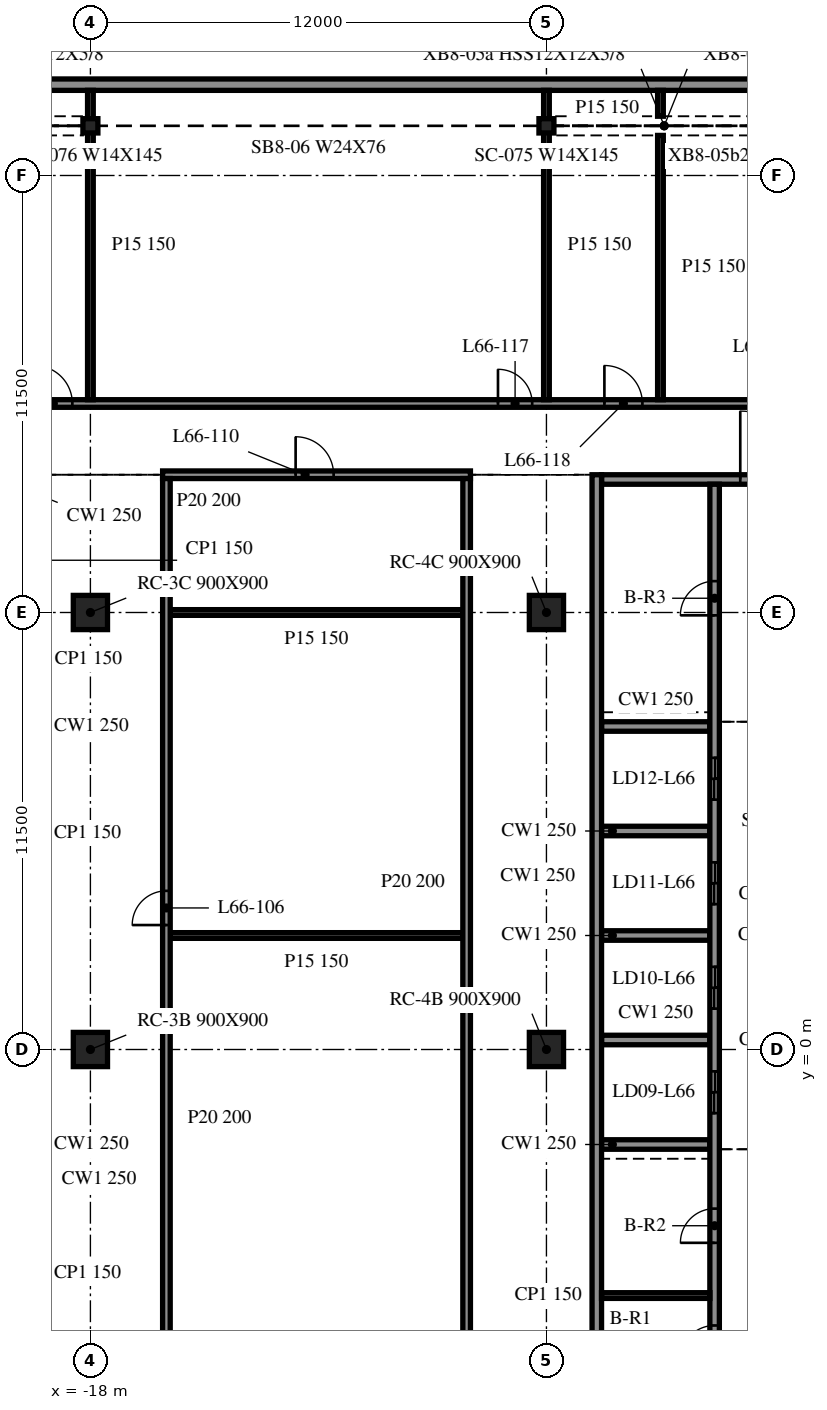
"""IFC4 building model, lengths in metres.
Left out: names, types, materials, properties, quantities, classifications, styles, units other than length and angle.
Written with IfcOpenShell. Run it as: python <this file> out.ifc"""

import sys

from ifc_helpers import new_model, si_unit, direction, frame, frame_2d, origin, origin_2d, place, context, subcontext, project, spatial, rectangle, i_section, extrude, element, fill, save


model = new_model("IFC4")
c1 = context("Model", 3, precision=1e-05, world=origin(), true_north=direction((0.0, 1.0)))
c2 = subcontext(c1, "Body", "Model", "MODEL_VIEW")
j1 = project(units=[si_unit("LENGTHUNIT", "METRE"), si_unit("PLANEANGLEUNIT", "RADIAN")], contexts=[c1])
p1 = place(None, origin())
s1 = spatial("IfcSite", under=j1, at=p1, CompositionType="ELEMENT")
p2 = place(p1, origin())
s2 = spatial("IfcBuilding", under=s1, at=p2, CompositionType="ELEMENT")
p3 = place(p2, frame((0.0, 0.0, 270.9)))
s3 = spatial("IfcBuildingStorey", under=s2, at=p3, CompositionType="ELEMENT", Elevation=270.9)
for number, where, z_axis, x_axis in (
    (1, (-18.0, 0.0, -0.34), (0.0, 0.0, 1.0), (1.0, 0.0, 0.0)),
    (2, (-18.0, 11.5, -0.34), (0.0, 0.0, 1.0), (1.0, 0.0, 0.0)),
    (3, (-6.0, 0.0, -0.34), (0.0, 0.0, 1.0), (1.0, 0.0, 0.0)),
    (4, (-6.0, 11.5, -0.34), (0.0, 0.0, 1.0), (1.0, 0.0, 0.0)),
):
    element("IfcColumn", number, at=place(p3, frame(where, z_axis=z_axis, x_axis=x_axis)), inside=s3, PredefinedType="COLUMN", context=c2, shape_type="SweptSolid", body=[
        extrude(rectangle(XDim=0.9, YDim=0.9, at=origin_2d()), origin(), (0.0, 0.0, 1.0), 3.8),
    ])
for number, where, z_axis, x_axis in (
    (5, (-6.0, 24.307, -0.34), (0.0, 0.0, 1.0), (1.0, 0.0, 0.0)),
    (6, (-18.0, 24.307, -0.34), (0.0, 0.0, 1.0), (1.0, 0.0, 0.0)),
):
    element("IfcColumn", number, at=place(p3, frame(where, z_axis=z_axis, x_axis=x_axis)), inside=s3, PredefinedType="COLUMN", context=c2, shape_type="SweptSolid", body=[
        extrude(i_section(OverallWidth=0.394, OverallDepth=0.376, WebThickness=0.017, FlangeThickness=0.028, at=origin_2d()), origin(), (0.0, 0.0, 1.0), 3.8),
    ])
p4 = place(p3, frame((42.0, 25.39, 0.0), z_axis=(0.0, 0.0, 1.0), x_axis=(-1.0, 0.0, 0.0)))
e7 = element("IfcWall", 7, at=p4, inside=s3, PredefinedType="NOTDEFINED", context=c2, shape_type="SweptSolid", body=[
    extrude(rectangle(XDim=84.0, YDim=0.3, at=frame_2d((42.0, 0.0))), origin(), (0.0, 0.0, 1.0), 2.853),
])
p5 = place(p3, frame((-4.675, 15.125, 0.0), z_axis=(0.0, 0.0, 1.0), x_axis=(0.0, -1.0, 0.0)))
e8 = element("IfcWall", 8, at=p5, inside=s3, PredefinedType="SOLIDWALL", context=c2, shape_type="SweptSolid", body=[
    extrude(rectangle(XDim=24.25, YDim=0.25, at=frame_2d((12.125, 0.0))), origin(), (0.0, 0.0, 1.0), 3.46),
])
p6 = place(p3, frame((-4.55, 15.0, 0.0), z_axis=(0.0, 0.0, 1.0), x_axis=(1.0, 0.0, 0.0)))
e9 = element("IfcWall", 9, at=p6, inside=s3, PredefinedType="SOLIDWALL", context=c2, shape_type="SweptSolid", body=[
    extrude(rectangle(XDim=9.1, YDim=0.25, at=frame_2d((4.55, 0.0))), origin(), (0.0, 0.0, 1.0), 3.46),
])
p7 = place(p6, frame((3.65, 0.0, 0.0)))
e10 = element("IfcOpeningElement", 10, at=p7, cuts=e9, PredefinedType="OPENING", context=c2, shape_type="SweptSolid", body=[
    extrude(rectangle(XDim=1.8, YDim=2.1, at=frame_2d((0.9, 1.05))), frame((0.0, 0.135, 0.0), z_axis=(0.0, -1.0, 0.0), x_axis=(1.0, 0.0, 0.0)), (0.0, 0.0, 1.0), 0.27),
])
p8 = place(p3, frame((-1.575, -8.875, 0.0), z_axis=(0.0, 0.0, 1.0), x_axis=(0.0, 1.0, 0.0)))
e11 = element("IfcWall", 11, at=p8, inside=s3, PredefinedType="SOLIDWALL", context=c2, shape_type="SweptSolid", body=[
    extrude(rectangle(XDim=23.75, YDim=0.25, at=frame_2d((11.875, 0.0))), origin(), (0.0, 0.0, 1.0), 3.46),
])
p9 = place(p8, frame((7.2, 0.0, 0.0)))
e12 = element("IfcOpeningElement", 12, at=p9, cuts=e11, PredefinedType="OPENING", context=c2, shape_type="SweptSolid", body=[
    extrude(rectangle(XDim=1.1, YDim=2.1, at=frame_2d((0.55, 1.05))), frame((0.0, 0.135, 0.0), z_axis=(0.0, -1.0, 0.0), x_axis=(1.0, 0.0, 0.0)), (0.0, 0.0, 1.0), 0.27),
])
p10 = place(p8, frame((9.95, 0.0, 0.0)))
e13 = element("IfcOpeningElement", 13, at=p10, cuts=e11, PredefinedType="OPENING", context=c2, shape_type="SweptSolid", body=[
    extrude(rectangle(XDim=1.1, YDim=2.1, at=frame_2d((0.55, 1.05))), frame((0.0, 0.135, 0.0), z_axis=(0.0, -1.0, 0.0), x_axis=(1.0, 0.0, 0.0)), (0.0, 0.0, 1.0), 0.27),
])
p11 = place(p8, frame((12.7, 0.0, 0.0)))
e14 = element("IfcOpeningElement", 14, at=p11, cuts=e11, PredefinedType="OPENING", context=c2, shape_type="SweptSolid", body=[
    extrude(rectangle(XDim=1.1, YDim=2.1, at=frame_2d((0.55, 1.05))), frame((0.0, 0.135, 0.0), z_axis=(0.0, -1.0, 0.0), x_axis=(1.0, 0.0, 0.0)), (0.0, 0.0, 1.0), 0.27),
])
p12 = place(p8, frame((15.45, 0.0, 0.0)))
e15 = element("IfcOpeningElement", 15, at=p12, cuts=e11, PredefinedType="OPENING", context=c2, shape_type="SweptSolid", body=[
    extrude(rectangle(XDim=1.1, YDim=2.1, at=frame_2d((0.55, 1.05))), frame((0.0, 0.135, 0.0), z_axis=(0.0, -1.0, 0.0), x_axis=(1.0, 0.0, 0.0)), (0.0, 0.0, 1.0), 0.27),
])
p13 = place(p8, frame((0.712, 0.0, 0.0)))
e16 = element("IfcOpeningElement", 16, at=p13, cuts=e11, PredefinedType="OPENING", context=c2, shape_type="SweptSolid", body=[
    extrude(rectangle(XDim=0.9, YDim=2.1, at=frame_2d((0.45, 1.05))), frame((0.0, 0.135, 0.0), z_axis=(0.0, -1.0, 0.0), x_axis=(1.0, 0.0, 0.0)), (0.0, 0.0, 1.0), 0.27),
])
p14 = place(p8, frame((3.788, 0.0, 0.0)))
e17 = element("IfcOpeningElement", 17, at=p14, cuts=e11, PredefinedType="OPENING", context=c2, shape_type="SweptSolid", body=[
    extrude(rectangle(XDim=0.9, YDim=2.1, at=frame_2d((0.45, 1.05))), frame((0.0, 0.135, 0.0), z_axis=(0.0, -1.0, 0.0), x_axis=(1.0, 0.0, 0.0)), (0.0, 0.0, 1.0), 0.27),
])
p15 = place(p8, frame((20.3, 0.0, 0.0)))
e18 = element("IfcOpeningElement", 18, at=p15, cuts=e11, PredefinedType="OPENING", context=c2, shape_type="SweptSolid", body=[
    extrude(rectangle(XDim=0.9, YDim=2.1, at=frame_2d((0.45, 1.05))), frame((0.0, 0.135, 0.0), z_axis=(0.0, -1.0, 0.0), x_axis=(1.0, 0.0, 0.0)), (0.0, 0.0, 1.0), 0.27),
])
for number, where, z_axis, x_axis in (
    (19, (-4.55, -2.5, 0.0), (0.0, 0.0, 1.0), (1.0, 0.0, 0.0)),
    (20, (-4.55, 0.25, 0.0), (0.0, 0.0, 1.0), (1.0, 0.0, 0.0)),
    (21, (-4.55, 3.0, 0.0), (0.0, 0.0, 1.0), (1.0, 0.0, 0.0)),
    (22, (-4.55, 5.75, 0.0), (0.0, 0.0, 1.0), (1.0, 0.0, 0.0)),
    (23, (-4.55, 8.5, 0.0), (0.0, 0.0, 1.0), (1.0, 0.0, 0.0)),
):
    element("IfcWall", number, at=place(p3, frame(where, z_axis=z_axis, x_axis=x_axis)), inside=s3, PredefinedType="SOLIDWALL", context=c2, shape_type="SweptSolid", body=[
        extrude(rectangle(XDim=2.85, YDim=0.25, at=frame_2d((1.425, 0.0))), origin(), (0.0, 0.0, 1.0), 3.46),
    ])
p16 = place(p3, frame((-4.55, -6.475, 0.0), z_axis=(0.0, 0.0, 1.0), x_axis=(1.0, 0.0, 0.0)))
e24 = element("IfcWall", 24, at=p16, inside=s3, PredefinedType="PARTITIONING", context=c2, shape_type="SweptSolid", body=[
    extrude(rectangle(XDim=2.85, YDim=0.15, at=frame_2d((1.425, 0.0))), origin(), (0.0, 0.0, 1.0), 3.46),
])
for number, where, z_axis, x_axis in (
    (25, (-15.9, 3.0, 0.0), (0.0, 0.0, 1.0), (1.0, 0.0, 0.0)),
    (26, (-15.9, 11.5, 0.0), (0.0, 0.0, 1.0), (1.0, 0.0, 0.0)),
):
    element("IfcWall", number, at=place(p3, frame(where, z_axis=z_axis, x_axis=x_axis)), inside=s3, PredefinedType="PARTITIONING", context=c2, shape_type="SweptSolid", body=[
        extrude(rectangle(XDim=7.7, YDim=0.15, at=frame_2d((3.85, 0.0))), origin(), (0.0, 0.0, 1.0), 3.46),
    ])
p17 = place(p3, frame((-16.1, 15.125, 0.0), z_axis=(0.0, 0.0, 1.0), x_axis=(1.0, 0.0, 0.0)))
e27 = element("IfcWall", 27, at=p17, inside=s3, PredefinedType="PARTITIONING", context=c2, shape_type="SweptSolid", body=[
    extrude(rectangle(XDim=8.1, YDim=0.2, at=frame_2d((4.05, 0.0))), origin(), (0.0, 0.0, 1.0), 3.46),
])
p18 = place(p17, frame((3.5, 0.0, 0.0)))
e28 = element("IfcOpeningElement", 28, at=p18, cuts=e27, PredefinedType="OPENING", context=c2, shape_type="SweptSolid", body=[
    extrude(rectangle(XDim=1.0, YDim=2.1, at=frame_2d((0.5, 1.05))), frame((0.0, 0.11, 0.0), z_axis=(0.0, -1.0, 0.0), x_axis=(1.0, 0.0, 0.0)), (0.0, 0.0, 1.0), 0.22),
])
p19 = place(p3, frame((-47.975, 17.0, 0.0), z_axis=(0.0, 0.0, 1.0), x_axis=(1.0, 0.0, 0.0)))
e29 = element("IfcWall", 29, at=p19, inside=s3, PredefinedType="PARTITIONING", context=c2, shape_type="SweptSolid", body=[
    extrude(rectangle(XDim=95.95, YDim=0.2, at=frame_2d((47.975, 0.0))), origin(), (0.0, 0.0, 1.0), 3.46),
])
p20 = place(p19, frame((10.7, 0.0, 0.0)))
e30 = element("IfcOpeningElement", 30, at=p20, cuts=e29, PredefinedType="OPENING", context=c2, shape_type="SweptSolid", body=[
    extrude(rectangle(XDim=0.9, YDim=2.1, at=frame_2d((0.45, 1.05))), frame((0.0, 0.11, 0.0), z_axis=(0.0, -1.0, 0.0), x_axis=(1.0, 0.0, 0.0)), (0.0, 0.0, 1.0), 0.22),
])
p21 = place(p19, frame((13.7, 0.0, 0.0)))
e31 = element("IfcOpeningElement", 31, at=p21, cuts=e29, PredefinedType="OPENING", context=c2, shape_type="SweptSolid", body=[
    extrude(rectangle(XDim=0.9, YDim=2.1, at=frame_2d((0.45, 1.05))), frame((0.0, 0.11, 0.0), z_axis=(0.0, -1.0, 0.0), x_axis=(1.0, 0.0, 0.0)), (0.0, 0.0, 1.0), 0.22),
])
p22 = place(p19, frame((22.5, 0.0, 0.0)))
e32 = element("IfcOpeningElement", 32, at=p22, cuts=e29, PredefinedType="OPENING", context=c2, shape_type="SweptSolid", body=[
    extrude(rectangle(XDim=1.0, YDim=2.1, at=frame_2d((0.5, 1.05))), frame((0.0, 0.11, 0.0), z_axis=(0.0, -1.0, 0.0), x_axis=(1.0, 0.0, 0.0)), (0.0, 0.0, 1.0), 0.22),
])
p23 = place(p19, frame((28.5, 0.0, 0.0)))
e33 = element("IfcOpeningElement", 33, at=p23, cuts=e29, PredefinedType="OPENING", context=c2, shape_type="SweptSolid", body=[
    extrude(rectangle(XDim=1.0, YDim=2.1, at=frame_2d((0.5, 1.05))), frame((0.0, 0.11, 0.0), z_axis=(0.0, -1.0, 0.0), x_axis=(1.0, 0.0, 0.0)), (0.0, 0.0, 1.0), 0.22),
])
p24 = place(p19, frame((40.7, 0.0, 0.0)))
e34 = element("IfcOpeningElement", 34, at=p24, cuts=e29, PredefinedType="OPENING", context=c2, shape_type="SweptSolid", body=[
    extrude(rectangle(XDim=0.9, YDim=2.1, at=frame_2d((0.45, 1.05))), frame((0.0, 0.11, 0.0), z_axis=(0.0, -1.0, 0.0), x_axis=(1.0, 0.0, 0.0)), (0.0, 0.0, 1.0), 0.22),
])
p25 = place(p19, frame((43.5, 0.0, 0.0)))
e35 = element("IfcOpeningElement", 35, at=p25, cuts=e29, PredefinedType="OPENING", context=c2, shape_type="SweptSolid", body=[
    extrude(rectangle(XDim=1.0, YDim=2.1, at=frame_2d((0.5, 1.05))), frame((0.0, 0.11, 0.0), z_axis=(0.0, -1.0, 0.0), x_axis=(1.0, 0.0, 0.0)), (0.0, 0.0, 1.0), 0.22),
])
p26 = place(p19, frame((47.3, 0.0, 0.0)))
e36 = element("IfcOpeningElement", 36, at=p26, cuts=e29, PredefinedType="OPENING", context=c2, shape_type="SweptSolid", body=[
    extrude(rectangle(XDim=0.9, YDim=2.1, at=frame_2d((0.45, 1.05))), frame((0.0, 0.11, 0.0), z_axis=(0.0, -1.0, 0.0), x_axis=(1.0, 0.0, 0.0)), (0.0, 0.0, 1.0), 0.22),
])
p27 = place(p19, frame((54.1, 0.0, 0.0)))
e37 = element("IfcOpeningElement", 37, at=p27, cuts=e29, PredefinedType="OPENING", context=c2, shape_type="SweptSolid", body=[
    extrude(rectangle(XDim=0.9, YDim=2.1, at=frame_2d((0.45, 1.05))), frame((0.0, 0.11, 0.0), z_axis=(0.0, -1.0, 0.0), x_axis=(1.0, 0.0, 0.0)), (0.0, 0.0, 1.0), 0.22),
])
p28 = place(p19, frame((60.1, 0.0, 0.0)))
e38 = element("IfcOpeningElement", 38, at=p28, cuts=e29, PredefinedType="OPENING", context=c2, shape_type="SweptSolid", body=[
    extrude(rectangle(XDim=1.0, YDim=2.1, at=frame_2d((0.5, 1.05))), frame((0.0, 0.11, 0.0), z_axis=(0.0, -1.0, 0.0), x_axis=(1.0, 0.0, 0.0)), (0.0, 0.0, 1.0), 0.22),
])
p29 = place(p19, frame((72.1, 0.0, 0.0)))
e39 = element("IfcOpeningElement", 39, at=p29, cuts=e29, PredefinedType="OPENING", context=c2, shape_type="SweptSolid", body=[
    extrude(rectangle(XDim=1.0, YDim=2.1, at=frame_2d((0.5, 1.05))), frame((0.0, 0.11, 0.0), z_axis=(0.0, -1.0, 0.0), x_axis=(1.0, 0.0, 0.0)), (0.0, 0.0, 1.0), 0.22),
])
p30 = place(p19, frame((75.1, 0.0, 0.0)))
e40 = element("IfcOpeningElement", 40, at=p30, cuts=e29, PredefinedType="OPENING", context=c2, shape_type="SweptSolid", body=[
    extrude(rectangle(XDim=0.9, YDim=2.1, at=frame_2d((0.45, 1.05))), frame((0.0, 0.11, 0.0), z_axis=(0.0, -1.0, 0.0), x_axis=(1.0, 0.0, 0.0)), (0.0, 0.0, 1.0), 0.22),
])
p31 = place(p19, frame((84.1, 0.0, 0.0)))
e41 = element("IfcOpeningElement", 41, at=p31, cuts=e29, PredefinedType="OPENING", context=c2, shape_type="SweptSolid", body=[
    extrude(rectangle(XDim=1.0, YDim=2.1, at=frame_2d((0.5, 1.05))), frame((0.0, 0.11, 0.0), z_axis=(0.0, -1.0, 0.0), x_axis=(1.0, 0.0, 0.0)), (0.0, 0.0, 1.0), 0.22),
])
p32 = place(p19, frame((90.1, 0.0, 0.0)))
e42 = element("IfcOpeningElement", 42, at=p32, cuts=e29, PredefinedType="OPENING", context=c2, shape_type="SweptSolid", body=[
    extrude(rectangle(XDim=0.9, YDim=2.1, at=frame_2d((0.45, 1.05))), frame((0.0, 0.11, 0.0), z_axis=(0.0, -1.0, 0.0), x_axis=(1.0, 0.0, 0.0)), (0.0, 0.0, 1.0), 0.22),
])
p33 = place(p3, frame((-18.0, 17.1, 0.0), z_axis=(0.0, 0.0, 1.0), x_axis=(0.0, 1.0, 0.0)))
e43 = element("IfcWall", 43, at=p33, inside=s3, PredefinedType="PARTITIONING", context=c2, shape_type="SweptSolid", body=[
    extrude(rectangle(XDim=8.14, YDim=0.15, at=frame_2d((4.07, 0.0))), origin(), (0.0, 0.0, 1.0), 3.46),
])
p34 = place(p3, frame((-16.0, -9.025, 0.0), z_axis=(0.0, 0.0, 1.0), x_axis=(0.0, 1.0, 0.0)))
e44 = element("IfcWall", 44, at=p34, inside=s3, PredefinedType="PARTITIONING", context=c2, shape_type="SweptSolid", body=[
    extrude(rectangle(XDim=24.05, YDim=0.2, at=frame_2d((12.025, 0.0))), origin(), (0.0, 0.0, 1.0), 3.46),
])
p35 = place(p34, frame((12.3, 0.0, 0.0)))
e45 = element("IfcOpeningElement", 45, at=p35, cuts=e44, PredefinedType="OPENING", context=c2, shape_type="SweptSolid", body=[
    extrude(rectangle(XDim=0.9, YDim=2.1, at=frame_2d((0.45, 1.05))), frame((0.0, 0.11, 0.0), z_axis=(0.0, -1.0, 0.0), x_axis=(1.0, 0.0, 0.0)), (0.0, 0.0, 1.0), 0.22),
])
p36 = place(p3, frame((-8.1, -9.025, 0.0), z_axis=(0.0, 0.0, 1.0), x_axis=(0.0, 1.0, 0.0)))
e46 = element("IfcWall", 46, at=p36, inside=s3, PredefinedType="PARTITIONING", context=c2, shape_type="SweptSolid", body=[
    extrude(rectangle(XDim=24.05, YDim=0.2, at=frame_2d((12.025, 0.0))), origin(), (0.0, 0.0, 1.0), 3.46),
])
p37 = place(p3, frame((-6.0, 17.1, 0.0), z_axis=(0.0, 0.0, 1.0), x_axis=(0.0, 1.0, 0.0)))
e47 = element("IfcWall", 47, at=p37, inside=s3, PredefinedType="PARTITIONING", context=c2, shape_type="SweptSolid", body=[
    extrude(rectangle(XDim=8.14, YDim=0.15, at=frame_2d((4.07, 0.0))), origin(), (0.0, 0.0, 1.0), 3.46),
])
p38 = place(p3, frame((-3.0, 17.1, 0.0), z_axis=(0.0, 0.0, 1.0), x_axis=(0.0, 1.0, 0.0)))
e48 = element("IfcWall", 48, at=p38, inside=s3, PredefinedType="PARTITIONING", context=c2, shape_type="SweptSolid", body=[
    extrude(rectangle(XDim=6.955, YDim=0.15, at=frame_2d((3.477, 0.0))), origin(), (0.0, 0.0, 1.0), 3.46),
])
p39 = place(p3, frame((-3.0, 24.559, 0.0), z_axis=(0.0, 0.0, 1.0), x_axis=(0.0, 1.0, 0.0)))
e49 = element("IfcWall", 49, at=p39, inside=s3, PredefinedType="PARTITIONING", context=c2, shape_type="SweptSolid", body=[
    extrude(rectangle(XDim=0.681, YDim=0.15, at=frame_2d((0.34, 0.0))), origin(), (0.0, 0.0, 1.0), 3.46),
])
p40 = place(p7, origin())
e50 = element("IfcDoor", 50, at=p40, inside=s3, OperationType="DOUBLE_DOOR_SINGLE_SWING", PredefinedType="DOOR", context=c2, shape_type="SweptSolid", body=[
    extrude(rectangle(XDim=1.8, YDim=2.1, at=frame_2d((0.9, 1.05))), frame((0.0, 0.025, 0.0), z_axis=(0.0, -1.0, 0.0), x_axis=(1.0, 0.0, 0.0)), (0.0, 0.0, 1.0), 0.05),
])
fill(e10, e50)
p41 = place(p9, origin())
e51 = element("IfcDoor", 51, at=p41, inside=s3, OperationType="DOUBLE_DOOR_SLIDING", PredefinedType="DOOR", context=c2, shape_type="SweptSolid", body=[
    extrude(rectangle(XDim=1.1, YDim=2.1, at=frame_2d((0.55, 1.05))), frame((0.0, 0.025, 0.0), z_axis=(0.0, -1.0, 0.0), x_axis=(1.0, 0.0, 0.0)), (0.0, 0.0, 1.0), 0.05),
])
fill(e12, e51)
p42 = place(p10, origin())
e52 = element("IfcDoor", 52, at=p42, inside=s3, OperationType="DOUBLE_DOOR_SLIDING", PredefinedType="DOOR", context=c2, shape_type="SweptSolid", body=[
    extrude(rectangle(XDim=1.1, YDim=2.1, at=frame_2d((0.55, 1.05))), frame((0.0, 0.025, 0.0), z_axis=(0.0, -1.0, 0.0), x_axis=(1.0, 0.0, 0.0)), (0.0, 0.0, 1.0), 0.05),
])
fill(e13, e52)
p43 = place(p11, origin())
e53 = element("IfcDoor", 53, at=p43, inside=s3, OperationType="DOUBLE_DOOR_SLIDING", PredefinedType="DOOR", context=c2, shape_type="SweptSolid", body=[
    extrude(rectangle(XDim=1.1, YDim=2.1, at=frame_2d((0.55, 1.05))), frame((0.0, 0.025, 0.0), z_axis=(0.0, -1.0, 0.0), x_axis=(1.0, 0.0, 0.0)), (0.0, 0.0, 1.0), 0.05),
])
fill(e14, e53)
p44 = place(p12, origin())
e54 = element("IfcDoor", 54, at=p44, inside=s3, OperationType="DOUBLE_DOOR_SLIDING", PredefinedType="DOOR", context=c2, shape_type="SweptSolid", body=[
    extrude(rectangle(XDim=1.1, YDim=2.1, at=frame_2d((0.55, 1.05))), frame((0.0, 0.025, 0.0), z_axis=(0.0, -1.0, 0.0), x_axis=(1.0, 0.0, 0.0)), (0.0, 0.0, 1.0), 0.05),
])
fill(e15, e54)
p45 = place(p13, origin())
e55 = element("IfcDoor", 55, at=p45, inside=s3, OperationType="SINGLE_SWING_LEFT", PredefinedType="DOOR", context=c2, shape_type="SweptSolid", body=[
    extrude(rectangle(XDim=0.9, YDim=2.1, at=frame_2d((0.45, 1.05))), frame((0.0, 0.025, 0.0), z_axis=(0.0, -1.0, 0.0), x_axis=(1.0, 0.0, 0.0)), (0.0, 0.0, 1.0), 0.05),
])
fill(e16, e55)
p46 = place(p14, origin())
e56 = element("IfcDoor", 56, at=p46, inside=s3, OperationType="SINGLE_SWING_RIGHT", PredefinedType="DOOR", context=c2, shape_type="SweptSolid", body=[
    extrude(rectangle(XDim=0.9, YDim=2.1, at=frame_2d((0.45, 1.05))), frame((0.0, 0.025, 0.0), z_axis=(0.0, -1.0, 0.0), x_axis=(1.0, 0.0, 0.0)), (0.0, 0.0, 1.0), 0.05),
])
fill(e17, e56)
p47 = place(p15, origin())
e57 = element("IfcDoor", 57, at=p47, inside=s3, OperationType="SINGLE_SWING_LEFT", PredefinedType="DOOR", context=c2, shape_type="SweptSolid", body=[
    extrude(rectangle(XDim=0.9, YDim=2.1, at=frame_2d((0.45, 1.05))), frame((0.0, 0.025, 0.0), z_axis=(0.0, -1.0, 0.0), x_axis=(1.0, 0.0, 0.0)), (0.0, 0.0, 1.0), 0.05),
])
fill(e18, e57)
p48 = place(p35, origin())
e58 = element("IfcDoor", 58, at=p48, inside=s3, OperationType="SINGLE_SWING_LEFT", PredefinedType="DOOR", context=c2, shape_type="SweptSolid", body=[
    extrude(rectangle(XDim=0.9, YDim=2.1, at=frame_2d((0.45, 1.05))), frame((0.0, 0.025, 0.0), z_axis=(0.0, -1.0, 0.0), x_axis=(1.0, 0.0, 0.0)), (0.0, 0.0, 1.0), 0.05),
])
fill(e45, e58)
p49 = place(p18, origin())
e59 = element("IfcDoor", 59, at=p49, inside=s3, OperationType="SINGLE_SWING_RIGHT", PredefinedType="DOOR", context=c2, shape_type="SweptSolid", body=[
    extrude(rectangle(XDim=1.0, YDim=2.1, at=frame_2d((0.5, 1.05))), frame((0.0, 0.025, 0.0), z_axis=(0.0, -1.0, 0.0), x_axis=(1.0, 0.0, 0.0)), (0.0, 0.0, 1.0), 0.05),
])
fill(e28, e59)
p50 = place(p23, origin())
e60 = element("IfcDoor", 60, at=p50, inside=s3, OperationType="SINGLE_SWING_LEFT", PredefinedType="DOOR", context=c2, shape_type="SweptSolid", body=[
    extrude(rectangle(XDim=1.0, YDim=2.1, at=frame_2d((0.5, 1.05))), frame((0.0, 0.025, 0.0), z_axis=(0.0, -1.0, 0.0), x_axis=(1.0, 0.0, 0.0)), (0.0, 0.0, 1.0), 0.05),
])
fill(e33, e60)
p51 = place(p24, origin())
e61 = element("IfcDoor", 61, at=p51, inside=s3, OperationType="SINGLE_SWING_LEFT", PredefinedType="DOOR", context=c2, shape_type="SweptSolid", body=[
    extrude(rectangle(XDim=0.9, YDim=2.1, at=frame_2d((0.45, 1.05))), frame((0.0, 0.025, 0.0), z_axis=(0.0, -1.0, 0.0), x_axis=(1.0, 0.0, 0.0)), (0.0, 0.0, 1.0), 0.05),
])
fill(e34, e61)
p52 = place(p25, origin())
e62 = element("IfcDoor", 62, at=p52, inside=s3, OperationType="SINGLE_SWING_LEFT", PredefinedType="DOOR", context=c2, shape_type="SweptSolid", body=[
    extrude(rectangle(XDim=1.0, YDim=2.1, at=frame_2d((0.5, 1.05))), frame((0.0, 0.025, 0.0), z_axis=(0.0, -1.0, 0.0), x_axis=(1.0, 0.0, 0.0)), (0.0, 0.0, 1.0), 0.05),
])
fill(e35, e62)
save(model, sys.argv[1])
